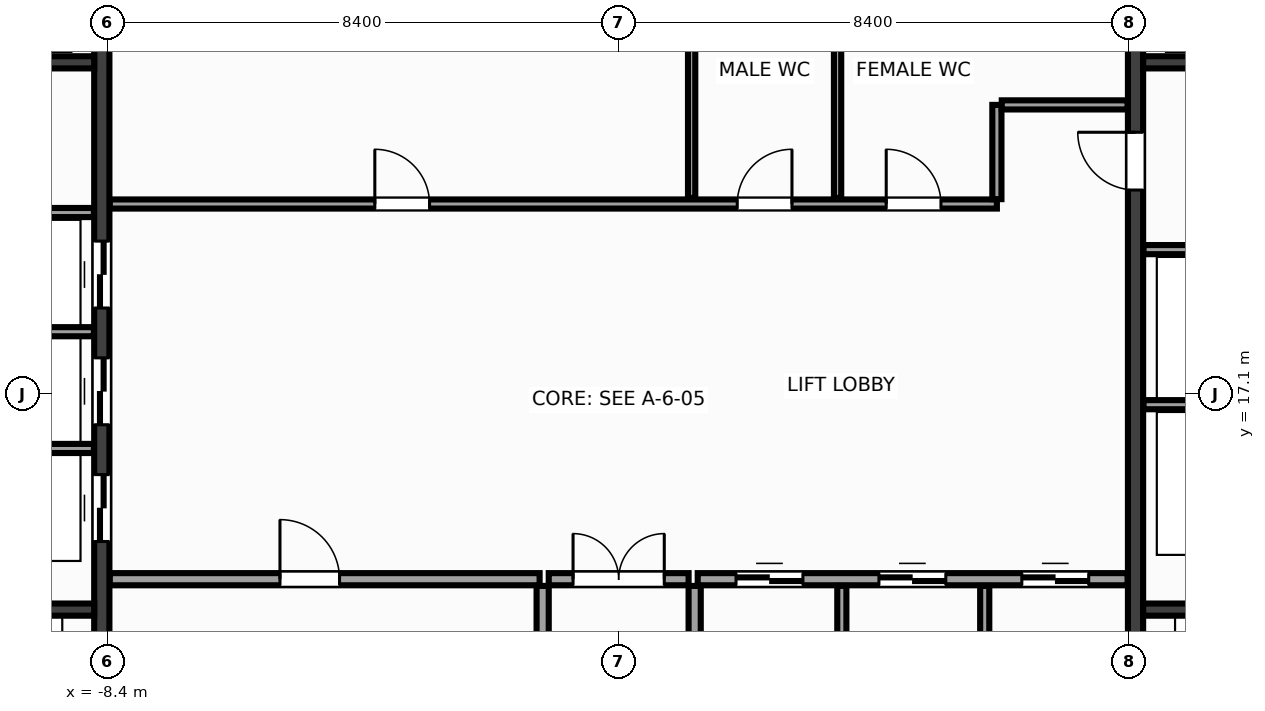
"""IFC4 building model, lengths in metres.
Left out: names, types, materials, properties, quantities, classifications, styles, units other than length and angle.
Written with IfcOpenShell. Run it as: python <this file> out.ifc"""

import sys

from ifc_helpers import new_model, si_unit, direction, frame, frame_2d, origin, place, context, subcontext, project, spatial, rectangle, extrude, source, transform, mapped, element, fill, save


model = new_model("IFC4")
c1 = context("Model", 3, precision=1e-05, world=origin(), true_north=direction((0.0, 1.0)))
c2 = subcontext(c1, "Body", "Model", "MODEL_VIEW")
j1 = project(units=[si_unit("LENGTHUNIT", "METRE"), si_unit("PLANEANGLEUNIT", "RADIAN")], contexts=[c1])
p1 = place(None, origin())
s1 = spatial("IfcSite", under=j1, at=p1, CompositionType="ELEMENT")
p2 = place(p1, origin())
s2 = spatial("IfcBuilding", under=s1, at=p2, CompositionType="ELEMENT")
p3 = place(p2, frame((0.0, 0.0, 171.2)))
s3 = spatial("IfcBuildingStorey", under=s2, at=p3, CompositionType="ELEMENT", Elevation=171.2)
m1 = source(origin(), c2, "Body", "SweptSolid", [
    extrude(rectangle(XDim=12.95, YDim=0.25, at=frame_2d((6.475, 0.0))), origin(), (0.0, 0.0, 1.0), 3.6),
])
p4 = place(p3, frame((-8.5, 10.525, 0.0), z_axis=(0.0, 0.0, 1.0), x_axis=(0.0, 1.0, 0.0)))
e1 = element("IfcWall", 1, at=p4, inside=s3, PredefinedType="SHEAR", context=c2, shape_type="MappedRepresentation", body=[
    mapped(m1, transform((0.0, 0.0, 0.0), x_axis=(1.0, 0.0, 0.0), y_axis=(0.0, 1.0, 0.0), z_axis=(0.0, 0.0, 1.0), scale=1.0)),
])
p5 = place(p4, frame((4.145, 0.0, 0.0)))
e2 = element("IfcOpeningElement", 2, at=p5, cuts=e1, PredefinedType="OPENING", context=c2, shape_type="SweptSolid", body=[
    extrude(rectangle(XDim=1.1, YDim=2.15, at=frame_2d((0.55, 1.075))), frame((0.0, 0.137, 0.0), z_axis=(0.0, -1.0, 0.0), x_axis=(1.0, 0.0, 0.0)), (0.0, 0.0, 1.0), 0.274),
])
p6 = place(p4, frame((6.065, 0.0, 0.0)))
e3 = element("IfcOpeningElement", 3, at=p6, cuts=e1, PredefinedType="OPENING", context=c2, shape_type="SweptSolid", body=[
    extrude(rectangle(XDim=1.1, YDim=2.15, at=frame_2d((0.55, 1.075))), frame((0.0, 0.137, 0.0), z_axis=(0.0, -1.0, 0.0), x_axis=(1.0, 0.0, 0.0)), (0.0, 0.0, 1.0), 0.274),
])
p7 = place(p4, frame((7.985, 0.0, 0.0)))
e4 = element("IfcOpeningElement", 4, at=p7, cuts=e1, PredefinedType="OPENING", context=c2, shape_type="SweptSolid", body=[
    extrude(rectangle(XDim=1.1, YDim=2.15, at=frame_2d((0.55, 1.075))), frame((0.0, 0.137, 0.0), z_axis=(0.0, -1.0, 0.0), x_axis=(1.0, 0.0, 0.0)), (0.0, 0.0, 1.0), 0.274),
])
p8 = place(p3, frame((8.5, 10.525, 0.0), z_axis=(0.0, 0.0, 1.0), x_axis=(0.0, 1.0, 0.0)))
e5 = element("IfcWall", 5, at=p8, inside=s3, PredefinedType="SHEAR", context=c2, shape_type="MappedRepresentation", body=[
    mapped(m1, transform((0.0, 0.0, 0.0), x_axis=(1.0, 0.0, 0.0), y_axis=(0.0, 1.0, 0.0), z_axis=(0.0, 0.0, 1.0), scale=1.0)),
])
p9 = place(p8, frame((9.925, 0.0, 0.0)))
e6 = element("IfcOpeningElement", 6, at=p9, cuts=e5, PredefinedType="OPENING", context=c2, shape_type="SweptSolid", body=[
    extrude(rectangle(XDim=0.95, YDim=2.15, at=frame_2d((0.475, 1.075))), frame((0.0, 0.137, 0.0), z_axis=(0.0, -1.0, 0.0), x_axis=(1.0, 0.0, 0.0)), (0.0, 0.0, 1.0), 0.274),
])
m2 = source(origin(), c2, "Body", "SweptSolid", [
    extrude(rectangle(XDim=2.825, YDim=0.2, at=frame_2d((1.413, 0.0))), origin(), (0.0, 0.0, 1.0), 3.6),
])
for number, where, z_axis, x_axis in (
    (7, (-11.45, 13.55, 0.0), (0.0, 0.0, 1.0), (1.0, 0.0, 0.0)),
    (8, (8.625, 13.55, 0.0), (0.0, 0.0, 1.0), (1.0, 0.0, 0.0)),
):
    element("IfcWall", number, at=place(p3, frame(where, z_axis=z_axis, x_axis=x_axis)), inside=s3, PredefinedType="SHEAR", context=c2, shape_type="MappedRepresentation", body=[
        mapped(m2, transform((0.0, 0.0, 0.0), x_axis=(1.0, 0.0, 0.0), y_axis=(0.0, 1.0, 0.0), z_axis=(0.0, 0.0, 1.0), scale=1.0)),
    ])
m3 = source(origin(), c2, "Body", "SweptSolid", [
    extrude(rectangle(XDim=3.02, YDim=0.2, at=frame_2d((1.51, 0.0))), origin(), (0.0, 0.0, 1.0), 3.6),
])
for number, where, z_axis, x_axis in (
    (9, (-11.645, 22.55, 0.0), (0.0, 0.0, 1.0), (1.0, 0.0, 0.0)),
    (10, (8.625, 22.55, 0.0), (0.0, 0.0, 1.0), (1.0, 0.0, 0.0)),
):
    element("IfcWall", number, at=place(p3, frame(where, z_axis=z_axis, x_axis=x_axis)), inside=s3, PredefinedType="SHEAR", context=c2, shape_type="MappedRepresentation", body=[
        mapped(m3, transform((0.0, 0.0, 0.0), x_axis=(1.0, 0.0, 0.0), y_axis=(0.0, 1.0, 0.0), z_axis=(0.0, 0.0, 1.0), scale=1.0)),
    ])
m4 = source(origin(), c2, "Body", "SweptSolid", [
    extrude(rectangle(XDim=3.01, YDim=0.15, at=frame_2d((1.505, 0.0))), origin(), (0.0, 0.0, 1.0), 3.38),
])
for number, where, z_axis, x_axis in (
    (11, (-11.64, 16.2, 0.0), (0.0, 0.0, 1.0), (1.0, 0.0, 0.0)),
    (12, (-11.64, 18.12, 0.0), (0.0, 0.0, 1.0), (1.0, 0.0, 0.0)),
    (13, (-11.64, 20.08, 0.0), (0.0, 0.0, 1.0), (1.0, 0.0, 0.0)),
    (14, (8.63, 16.92, 0.0), (0.0, 0.0, 1.0), (1.0, 0.0, 0.0)),
    (15, (8.63, 19.47, 0.0), (0.0, 0.0, 1.0), (1.0, 0.0, 0.0)),
):
    element("IfcWall", number, at=place(p3, frame(where, z_axis=z_axis, x_axis=x_axis)), inside=s3, PredefinedType="PARTITIONING", context=c2, shape_type="MappedRepresentation", body=[
        mapped(m4, transform((0.0, 0.0, 0.0), x_axis=(1.0, 0.0, 0.0), y_axis=(0.0, 1.0, 0.0), z_axis=(0.0, 0.0, 1.0), scale=1.0)),
    ])
m5 = source(origin(), c2, "Body", "SweptSolid", [
    extrude(rectangle(XDim=7.07, YDim=0.2, at=frame_2d((3.535, 0.0))), origin(), (0.0, 0.0, 1.0), 3.38),
])
p10 = place(p3, frame((-8.37, 14.05, 0.0), z_axis=(0.0, 0.0, 1.0), x_axis=(1.0, 0.0, 0.0)))
e16 = element("IfcWall", 16, at=p10, inside=s3, PredefinedType="PARTITIONING", context=c2, shape_type="MappedRepresentation", body=[
    mapped(m5, transform((0.0, 0.0, 0.0), x_axis=(1.0, 0.0, 0.0), y_axis=(0.0, 1.0, 0.0), z_axis=(0.0, 0.0, 1.0), scale=1.0)),
])
p11 = place(p10, frame((2.8, 0.0, 0.0)))
e17 = element("IfcOpeningElement", 17, at=p11, cuts=e16, PredefinedType="OPENING", context=c2, shape_type="SweptSolid", body=[
    extrude(rectangle(XDim=0.98, YDim=2.15, at=frame_2d((0.49, 1.075))), frame((0.0, 0.112, 0.0), z_axis=(0.0, -1.0, 0.0), x_axis=(1.0, 0.0, 0.0)), (0.0, 0.0, 1.0), 0.224),
])
p12 = place(p3, frame((1.3, 14.05, 0.0), z_axis=(0.0, 0.0, 1.0), x_axis=(1.0, 0.0, 0.0)))
e18 = element("IfcWall", 18, at=p12, inside=s3, PredefinedType="PARTITIONING", context=c2, shape_type="MappedRepresentation", body=[
    mapped(m5, transform((0.0, 0.0, 0.0), x_axis=(1.0, 0.0, 0.0), y_axis=(0.0, 1.0, 0.0), z_axis=(0.0, 0.0, 1.0), scale=1.0)),
])
p13 = place(p12, frame((0.63, 0.0, 0.0)))
e19 = element("IfcOpeningElement", 19, at=p13, cuts=e18, PredefinedType="OPENING", context=c2, shape_type="SweptSolid", body=[
    extrude(rectangle(XDim=1.1, YDim=2.15, at=frame_2d((0.55, 1.075))), frame((0.0, 0.112, 0.0), z_axis=(0.0, -1.0, 0.0), x_axis=(1.0, 0.0, 0.0)), (0.0, 0.0, 1.0), 0.224),
])
p14 = place(p12, frame((2.98, 0.0, 0.0)))
e20 = element("IfcOpeningElement", 20, at=p14, cuts=e18, PredefinedType="OPENING", context=c2, shape_type="SweptSolid", body=[
    extrude(rectangle(XDim=1.1, YDim=2.15, at=frame_2d((0.55, 1.075))), frame((0.0, 0.112, 0.0), z_axis=(0.0, -1.0, 0.0), x_axis=(1.0, 0.0, 0.0)), (0.0, 0.0, 1.0), 0.224),
])
p15 = place(p12, frame((5.33, 0.0, 0.0)))
e21 = element("IfcOpeningElement", 21, at=p15, cuts=e18, PredefinedType="OPENING", context=c2, shape_type="SweptSolid", body=[
    extrude(rectangle(XDim=1.1, YDim=2.15, at=frame_2d((0.55, 1.075))), frame((0.0, 0.112, 0.0), z_axis=(0.0, -1.0, 0.0), x_axis=(1.0, 0.0, 0.0)), (0.0, 0.0, 1.0), 0.224),
])
m6 = source(origin(), c2, "Body", "SweptSolid", [
    extrude(rectangle(XDim=3.415, YDim=0.2, at=frame_2d((1.708, 0.0))), origin(), (0.0, 0.0, 1.0), 3.38),
])
for number, where, z_axis, x_axis in (
    (22, (-1.25, 10.525, 0.0), (0.0, 0.0, 1.0), (0.0, 1.0, 0.0)),
    (23, (1.25, 10.525, 0.0), (0.0, 0.0, 1.0), (0.0, 1.0, 0.0)),
):
    element("IfcWall", number, at=place(p3, frame(where, z_axis=z_axis, x_axis=x_axis)), inside=s3, PredefinedType="PARTITIONING", context=c2, shape_type="MappedRepresentation", body=[
        mapped(m6, transform((0.0, 0.0, 0.0), x_axis=(1.0, 0.0, 0.0), y_axis=(0.0, 1.0, 0.0), z_axis=(0.0, 0.0, 1.0), scale=1.0)),
    ])
m7 = source(origin(), c2, "Body", "SweptSolid", [
    extrude(rectangle(XDim=2.3, YDim=0.2, at=frame_2d((1.15, 0.0))), origin(), (0.0, 0.0, 1.0), 3.38),
])
p16 = place(p3, frame((-1.15, 14.05, 0.0), z_axis=(0.0, 0.0, 1.0), x_axis=(1.0, 0.0, 0.0)))
e24 = element("IfcWall", 24, at=p16, inside=s3, PredefinedType="PARTITIONING", context=c2, shape_type="MappedRepresentation", body=[
    mapped(m7, transform((0.0, 0.0, 0.0), x_axis=(1.0, 0.0, 0.0), y_axis=(0.0, 1.0, 0.0), z_axis=(0.0, 0.0, 1.0), scale=1.0)),
])
p17 = place(p16, frame((0.4, 0.0, 0.0)))
e25 = element("IfcOpeningElement", 25, at=p17, cuts=e24, PredefinedType="OPENING", context=c2, shape_type="SweptSolid", body=[
    extrude(rectangle(XDim=1.5, YDim=2.2, at=frame_2d((0.75, 1.1))), frame((0.0, 0.112, 0.0), z_axis=(0.0, -1.0, 0.0), x_axis=(1.0, 0.0, 0.0)), (0.0, 0.0, 1.0), 0.224),
])
m8 = source(origin(), c2, "Body", "SweptSolid", [
    extrude(rectangle(XDim=14.59, YDim=0.15, at=frame_2d((7.295, 0.0))), origin(), (0.0, 0.0, 1.0), 3.38),
])
p18 = place(p3, frame((-8.37, 20.22, 0.0), z_axis=(0.0, 0.0, 1.0), x_axis=(1.0, 0.0, 0.0)))
e26 = element("IfcWall", 26, at=p18, inside=s3, PredefinedType="PARTITIONING", context=c2, shape_type="MappedRepresentation", body=[
    mapped(m8, transform((0.0, 0.0, 0.0), x_axis=(1.0, 0.0, 0.0), y_axis=(0.0, 1.0, 0.0), z_axis=(0.0, 0.0, 1.0), scale=1.0)),
])
p19 = place(p18, frame((4.36, 0.0, 0.0)))
e27 = element("IfcOpeningElement", 27, at=p19, cuts=e26, PredefinedType="OPENING", context=c2, shape_type="SweptSolid", body=[
    extrude(rectangle(XDim=0.9, YDim=2.15, at=frame_2d((0.45, 1.075))), frame((0.0, 0.087, 0.0), z_axis=(0.0, -1.0, 0.0), x_axis=(1.0, 0.0, 0.0)), (0.0, 0.0, 1.0), 0.174),
])
p20 = place(p18, frame((10.32, 0.0, 0.0)))
e28 = element("IfcOpeningElement", 28, at=p20, cuts=e26, PredefinedType="OPENING", context=c2, shape_type="SweptSolid", body=[
    extrude(rectangle(XDim=0.9, YDim=2.15, at=frame_2d((0.45, 1.075))), frame((0.0, 0.087, 0.0), z_axis=(0.0, -1.0, 0.0), x_axis=(1.0, 0.0, 0.0)), (0.0, 0.0, 1.0), 0.174),
])
p21 = place(p18, frame((12.77, 0.0, 0.0)))
e29 = element("IfcOpeningElement", 29, at=p21, cuts=e26, PredefinedType="OPENING", context=c2, shape_type="SweptSolid", body=[
    extrude(rectangle(XDim=0.9, YDim=2.15, at=frame_2d((0.45, 1.075))), frame((0.0, 0.087, 0.0), z_axis=(0.0, -1.0, 0.0), x_axis=(1.0, 0.0, 0.0)), (0.0, 0.0, 1.0), 0.174),
])
m9 = source(origin(), c2, "Body", "SweptSolid", [
    extrude(rectangle(XDim=1.55, YDim=0.15, at=frame_2d((0.775, 0.0))), origin(), (0.0, 0.0, 1.0), 3.38),
])
p22 = place(p3, frame((6.22, 20.3, 0.0), z_axis=(0.0, 0.0, 1.0), x_axis=(0.0, 1.0, 0.0)))
e30 = element("IfcWall", 30, at=p22, inside=s3, PredefinedType="PARTITIONING", context=c2, shape_type="MappedRepresentation", body=[
    mapped(m9, transform((0.0, 0.0, 0.0), x_axis=(1.0, 0.0, 0.0), y_axis=(0.0, 1.0, 0.0), z_axis=(0.0, 0.0, 1.0), scale=1.0)),
])
m10 = source(origin(), c2, "Body", "SweptSolid", [
    extrude(rectangle(XDim=2.07, YDim=0.15, at=frame_2d((1.035, 0.0))), origin(), (0.0, 0.0, 1.0), 3.38),
])
p23 = place(p3, frame((6.3, 21.85, 0.0), z_axis=(0.0, 0.0, 1.0), x_axis=(1.0, 0.0, 0.0)))
e31 = element("IfcWall", 31, at=p23, inside=s3, PredefinedType="PARTITIONING", context=c2, shape_type="MappedRepresentation", body=[
    mapped(m10, transform((0.0, 0.0, 0.0), x_axis=(1.0, 0.0, 0.0), y_axis=(0.0, 1.0, 0.0), z_axis=(0.0, 0.0, 1.0), scale=1.0)),
])
m11 = source(origin(), c2, "Body", "SweptSolid", [
    extrude(rectangle(XDim=3.415, YDim=0.15, at=frame_2d((1.708, 0.0))), origin(), (0.0, 0.0, 1.0), 3.38),
])
for number, where, z_axis, x_axis in (
    (32, (3.67, 10.525, 0.0), (0.0, 0.0, 1.0), (0.0, 1.0, 0.0)),
    (33, (6.02, 10.525, 0.0), (0.0, 0.0, 1.0), (0.0, 1.0, 0.0)),
):
    element("IfcWall", number, at=place(p3, frame(where, z_axis=z_axis, x_axis=x_axis)), inside=s3, PredefinedType="PARTITIONING", context=c2, shape_type="MappedRepresentation", body=[
        mapped(m11, transform((0.0, 0.0, 0.0), x_axis=(1.0, 0.0, 0.0), y_axis=(0.0, 1.0, 0.0), z_axis=(0.0, 0.0, 1.0), scale=1.0)),
    ])
m12 = source(origin(), c2, "Body", "SweptSolid", [
    extrude(rectangle(XDim=3.115, YDim=0.12, at=frame_2d((1.558, 0.0))), origin(), (0.0, 0.0, 1.0), 3.38),
])
for number, where, z_axis, x_axis in (
    (34, (1.2, 20.32, 0.0), (0.0, 0.0, 1.0), (0.0, 1.0, 0.0)),
    (35, (3.6, 20.32, 0.0), (0.0, 0.0, 1.0), (0.0, 1.0, 0.0)),
):
    element("IfcWall", number, at=place(p3, frame(where, z_axis=z_axis, x_axis=x_axis)), inside=s3, PredefinedType="PARTITIONING", context=c2, shape_type="MappedRepresentation", body=[
        mapped(m12, transform((0.0, 0.0, 0.0), x_axis=(1.0, 0.0, 0.0), y_axis=(0.0, 1.0, 0.0), z_axis=(0.0, 0.0, 1.0), scale=1.0)),
    ])
m13 = source(origin(), c2, "Body", "SweptSolid", [
    extrude(rectangle(XDim=1.1, YDim=2.15, at=frame_2d((0.55, 1.075))), frame((0.0, 0.025, 0.0), z_axis=(0.0, -1.0, 0.0), x_axis=(1.0, 0.0, 0.0)), (0.0, 0.0, 1.0), 0.05),
])
p24 = place(p5, origin())
e36 = element("IfcDoor", 36, at=p24, inside=s3, OperationType="DOUBLE_DOOR_SLIDING", PredefinedType="DOOR", context=c2, shape_type="MappedRepresentation", body=[
    mapped(m13, transform((0.0, 0.0, 0.0), x_axis=(1.0, 0.0, 0.0), y_axis=(0.0, 1.0, 0.0), z_axis=(0.0, 0.0, 1.0), scale=1.0)),
])
fill(e2, e36)
p25 = place(p6, origin())
e37 = element("IfcDoor", 37, at=p25, inside=s3, OperationType="DOUBLE_DOOR_SLIDING", PredefinedType="DOOR", context=c2, shape_type="MappedRepresentation", body=[
    mapped(m13, transform((0.0, 0.0, 0.0), x_axis=(1.0, 0.0, 0.0), y_axis=(0.0, 1.0, 0.0), z_axis=(0.0, 0.0, 1.0), scale=1.0)),
])
fill(e3, e37)
p26 = place(p7, origin())
e38 = element("IfcDoor", 38, at=p26, inside=s3, OperationType="DOUBLE_DOOR_SLIDING", PredefinedType="DOOR", context=c2, shape_type="MappedRepresentation", body=[
    mapped(m13, transform((0.0, 0.0, 0.0), x_axis=(1.0, 0.0, 0.0), y_axis=(0.0, 1.0, 0.0), z_axis=(0.0, 0.0, 1.0), scale=1.0)),
])
fill(e4, e38)
m14 = source(origin(), c2, "Body", "SweptSolid", [
    extrude(rectangle(XDim=0.95, YDim=2.15, at=frame_2d((0.475, 1.075))), frame((0.0, 0.025, 0.0), z_axis=(0.0, -1.0, 0.0), x_axis=(1.0, 0.0, 0.0)), (0.0, 0.0, 1.0), 0.05),
])
p27 = place(p9, origin())
e39 = element("IfcDoor", 39, at=p27, inside=s3, OperationType="SINGLE_SWING_RIGHT", PredefinedType="DOOR", context=c2, shape_type="MappedRepresentation", body=[
    mapped(m14, transform((0.0, 0.0, 0.0), x_axis=(1.0, 0.0, 0.0), y_axis=(0.0, 1.0, 0.0), z_axis=(0.0, 0.0, 1.0), scale=1.0)),
])
fill(e6, e39)
m15 = source(origin(), c2, "Body", "SweptSolid", [
    extrude(rectangle(XDim=0.98, YDim=2.15, at=frame_2d((0.49, 1.075))), frame((0.0, 0.025, 0.0), z_axis=(0.0, -1.0, 0.0), x_axis=(1.0, 0.0, 0.0)), (0.0, 0.0, 1.0), 0.05),
])
p28 = place(p11, origin())
e40 = element("IfcDoor", 40, at=p28, inside=s3, OperationType="SINGLE_SWING_LEFT", PredefinedType="DOOR", context=c2, shape_type="MappedRepresentation", body=[
    mapped(m15, transform((0.0, 0.0, 0.0), x_axis=(1.0, 0.0, 0.0), y_axis=(0.0, 1.0, 0.0), z_axis=(0.0, 0.0, 1.0), scale=1.0)),
])
fill(e17, e40)
p29 = place(p13, origin())
e41 = element("IfcDoor", 41, at=p29, inside=s3, OperationType="DOUBLE_DOOR_SLIDING", PredefinedType="DOOR", context=c2, shape_type="MappedRepresentation", body=[
    mapped(m13, transform((0.0, 0.0, 0.0), x_axis=(1.0, 0.0, 0.0), y_axis=(0.0, 1.0, 0.0), z_axis=(0.0, 0.0, 1.0), scale=1.0)),
])
fill(e19, e41)
p30 = place(p14, origin())
e42 = element("IfcDoor", 42, at=p30, inside=s3, OperationType="DOUBLE_DOOR_SLIDING", PredefinedType="DOOR", context=c2, shape_type="MappedRepresentation", body=[
    mapped(m13, transform((0.0, 0.0, 0.0), x_axis=(1.0, 0.0, 0.0), y_axis=(0.0, 1.0, 0.0), z_axis=(0.0, 0.0, 1.0), scale=1.0)),
])
fill(e20, e42)
p31 = place(p15, origin())
e43 = element("IfcDoor", 43, at=p31, inside=s3, OperationType="DOUBLE_DOOR_SLIDING", PredefinedType="DOOR", context=c2, shape_type="MappedRepresentation", body=[
    mapped(m13, transform((0.0, 0.0, 0.0), x_axis=(1.0, 0.0, 0.0), y_axis=(0.0, 1.0, 0.0), z_axis=(0.0, 0.0, 1.0), scale=1.0)),
])
fill(e21, e43)
m16 = source(origin(), c2, "Body", "SweptSolid", [
    extrude(rectangle(XDim=1.5, YDim=2.2, at=frame_2d((0.75, 1.1))), frame((0.0, 0.025, 0.0), z_axis=(0.0, -1.0, 0.0), x_axis=(1.0, 0.0, 0.0)), (0.0, 0.0, 1.0), 0.05),
])
p32 = place(p17, origin())
e44 = element("IfcDoor", 44, at=p32, inside=s3, OperationType="DOUBLE_DOOR_SINGLE_SWING", PredefinedType="DOOR", context=c2, shape_type="MappedRepresentation", body=[
    mapped(m16, transform((0.0, 0.0, 0.0), x_axis=(1.0, 0.0, 0.0), y_axis=(0.0, 1.0, 0.0), z_axis=(0.0, 0.0, 1.0), scale=1.0)),
])
fill(e25, e44)
m17 = source(origin(), c2, "Body", "SweptSolid", [
    extrude(rectangle(XDim=0.9, YDim=2.15, at=frame_2d((0.45, 1.075))), frame((0.0, 0.025, 0.0), z_axis=(0.0, -1.0, 0.0), x_axis=(1.0, 0.0, 0.0)), (0.0, 0.0, 1.0), 0.05),
])
p33 = place(p19, origin())
e45 = element("IfcDoor", 45, at=p33, inside=s3, OperationType="SINGLE_SWING_LEFT", PredefinedType="DOOR", context=c2, shape_type="MappedRepresentation", body=[
    mapped(m17, transform((0.0, 0.0, 0.0), x_axis=(1.0, 0.0, 0.0), y_axis=(0.0, 1.0, 0.0), z_axis=(0.0, 0.0, 1.0), scale=1.0)),
])
fill(e27, e45)
p34 = place(p20, origin())
e46 = element("IfcDoor", 46, at=p34, inside=s3, OperationType="SINGLE_SWING_RIGHT", PredefinedType="DOOR", context=c2, shape_type="MappedRepresentation", body=[
    mapped(m17, transform((0.0, 0.0, 0.0), x_axis=(1.0, 0.0, 0.0), y_axis=(0.0, 1.0, 0.0), z_axis=(0.0, 0.0, 1.0), scale=1.0)),
])
fill(e28, e46)
p35 = place(p21, origin())
e47 = element("IfcDoor", 47, at=p35, inside=s3, OperationType="SINGLE_SWING_LEFT", PredefinedType="DOOR", context=c2, shape_type="MappedRepresentation", body=[
    mapped(m17, transform((0.0, 0.0, 0.0), x_axis=(1.0, 0.0, 0.0), y_axis=(0.0, 1.0, 0.0), z_axis=(0.0, 0.0, 1.0), scale=1.0)),
])
fill(e29, e47)
save(model, sys.argv[1])
